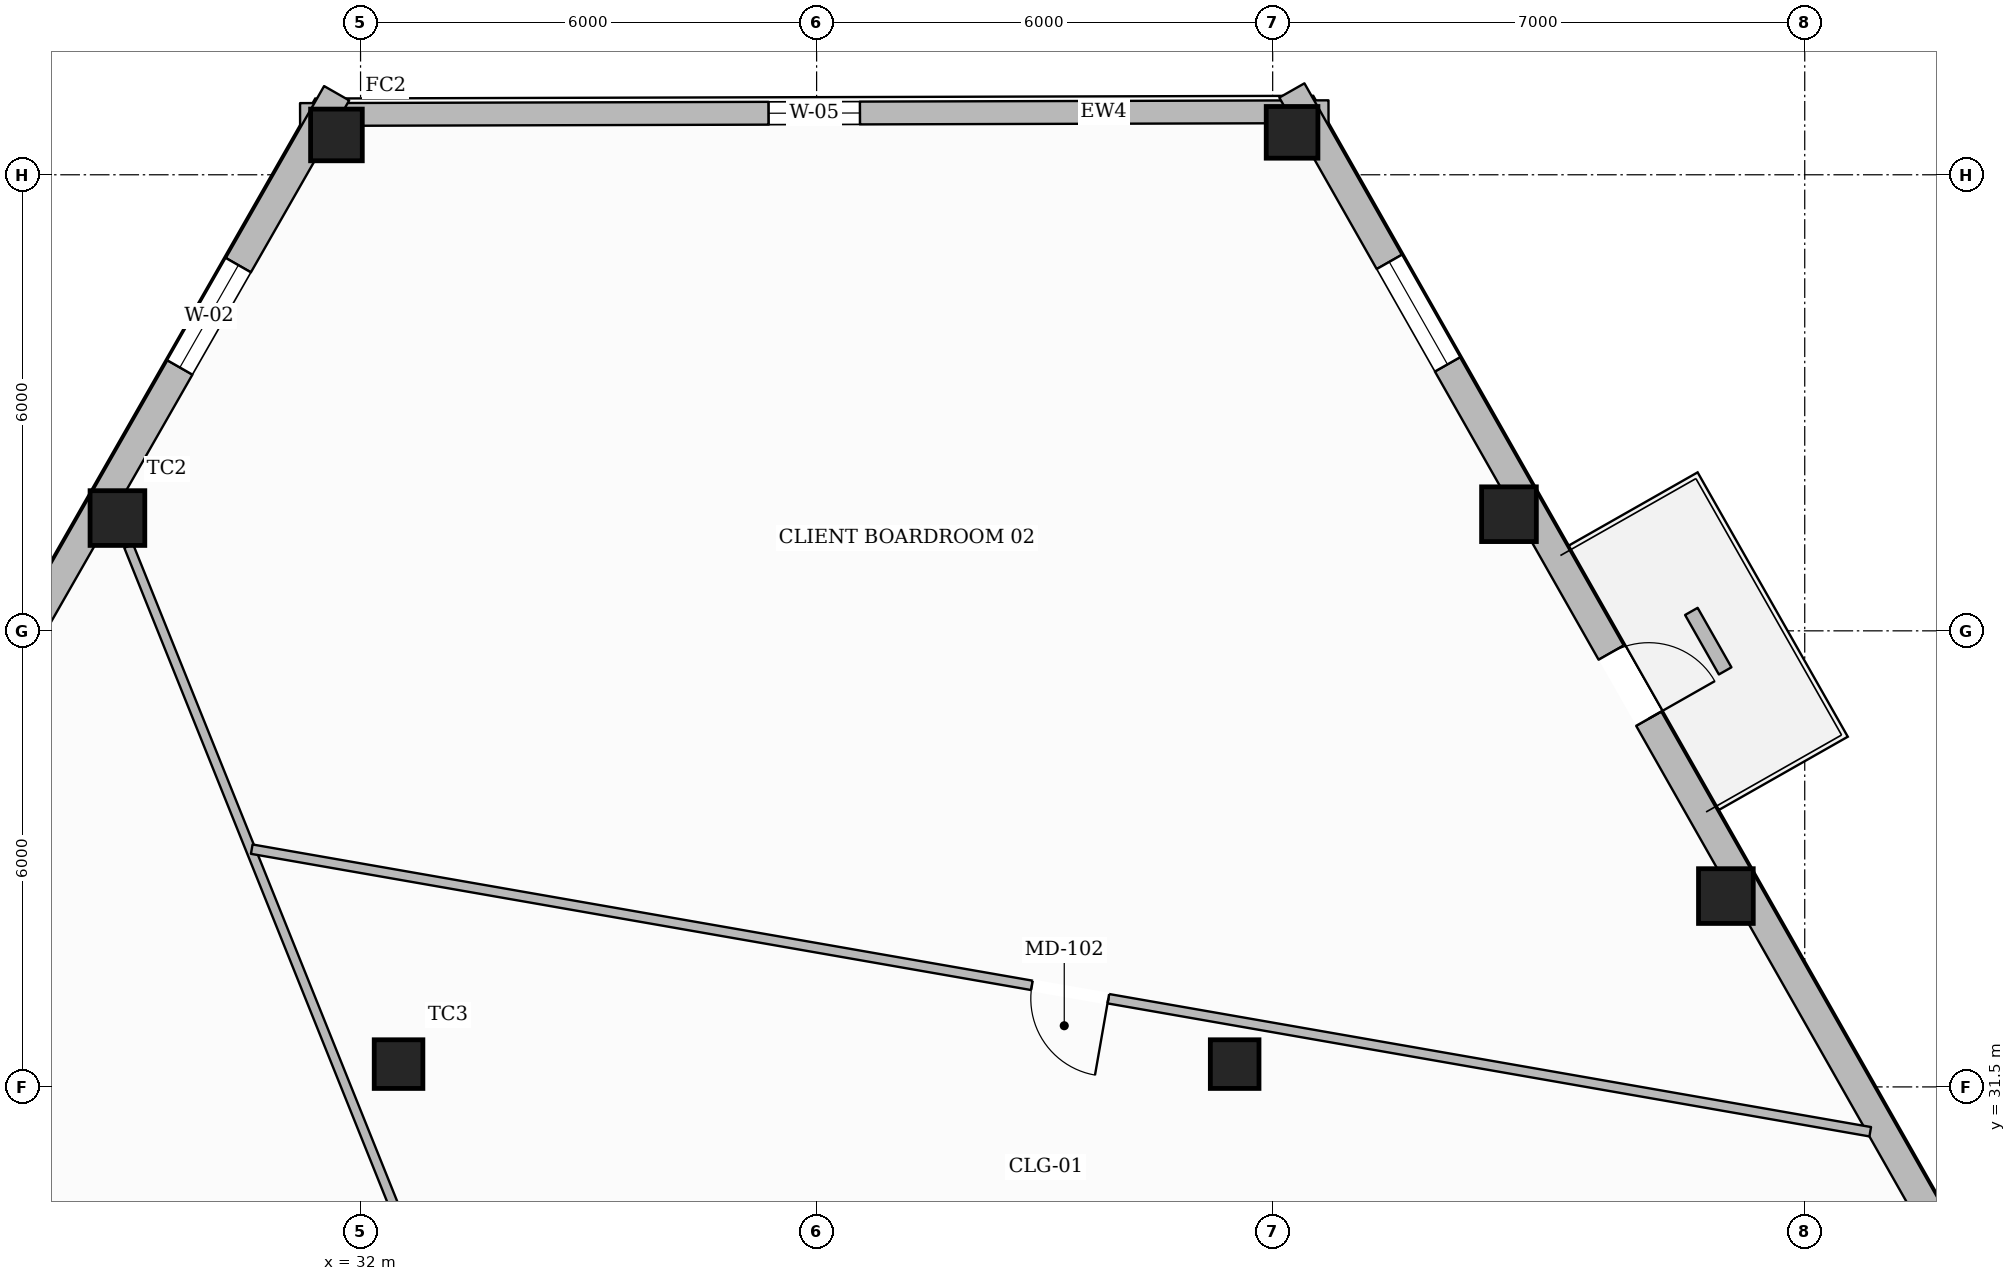
"""IFC4 building model, lengths in metres.
Left out: names, types, materials, properties, quantities, classifications, styles, units other than length and angle.
Written with IfcOpenShell. Run it as: python <this file> out.ifc"""

import sys

from ifc_helpers import new_model, si_unit, direction, frame, frame_2d, origin, origin_2d, place, context, subcontext, project, spatial, rectangle, hollow_rectangle, extrude, element, fill, save


model = new_model("IFC4")
c1 = context("Model", 3, precision=1e-05, world=origin(), true_north=direction((0.0, 1.0)))
c2 = subcontext(c1, "Body", "Model", "MODEL_VIEW")
j1 = project(units=[si_unit("LENGTHUNIT", "METRE"), si_unit("PLANEANGLEUNIT", "RADIAN")], contexts=[c1])
p1 = place(None, origin())
s1 = spatial("IfcSite", under=j1, at=p1, CompositionType="ELEMENT")
p2 = place(p1, origin())
s2 = spatial("IfcBuilding", under=s1, at=p2, CompositionType="ELEMENT")
p3 = place(p2, frame((0.0, 0.0, 89.35)))
s3 = spatial("IfcBuildingStorey", under=s2, at=p3, CompositionType="ELEMENT", Elevation=89.35)
p4 = place(p3, frame((31.683, 44.024, 0.0), z_axis=(0.0, 0.0, 1.0), x_axis=(1.0, 0.0, 0.0)))
e1 = element("IfcColumn", 1, at=p4, inside=s3, PredefinedType="COLUMN", context=c2, shape_type="SweptSolid", body=[
    extrude(hollow_rectangle(XDim=0.68, YDim=0.68, WallThickness=0.03, at=origin_2d()), origin(), (0.0, 0.0, 1.0), 3.6),
])
for number, where, z_axis, x_axis in (
    (2, (28.802, 38.984, 0.0), (0.0, 0.0, 1.0), (1.0, 0.0, 0.0)),
    (3, (49.963, 34.01, 0.0), (0.0, 0.0, 1.0), (1.0, 0.0, 0.0)),
    (4, (47.109, 39.034, 0.0), (0.0, 0.0, 1.0), (1.0, 0.0, 0.0)),
):
    element("IfcColumn", number, at=place(p3, frame(where, z_axis=z_axis, x_axis=x_axis)), inside=s3, PredefinedType="COLUMN", context=c2, shape_type="SweptSolid", body=[
        extrude(hollow_rectangle(XDim=0.72, YDim=0.72, WallThickness=0.032, at=origin_2d()), origin(), (0.0, 0.0, 1.0), 3.6),
    ])
p5 = place(p3, frame((44.255, 44.058, 0.0), z_axis=(0.0, 0.0, 1.0), x_axis=(1.0, 0.0, 0.0)))
e5 = element("IfcColumn", 5, at=p5, inside=s3, PredefinedType="COLUMN", context=c2, shape_type="SweptSolid", body=[
    extrude(hollow_rectangle(XDim=0.68, YDim=0.68, WallThickness=0.03, at=origin_2d()), origin(), (0.0, 0.0, 1.0), 3.6),
])
for number, where, z_axis, x_axis in (
    (6, (32.5, 31.8, 0.0), (0.0, 0.0, 1.0), (1.0, 0.0, 0.0)),
    (7, (43.5, 31.8, 0.0), (0.0, 0.0, 1.0), (1.0, 0.0, 0.0)),
):
    element("IfcColumn", number, at=place(p3, frame(where, z_axis=z_axis, x_axis=x_axis)), inside=s3, PredefinedType="COLUMN", context=c2, shape_type="SweptSolid", body=[
        extrude(hollow_rectangle(XDim=0.64, YDim=0.64, WallThickness=0.028, at=origin_2d()), origin(), (0.0, 0.0, 1.0), 3.6),
    ])
p6 = place(p3, frame((31.205, 44.293, 0.0), z_axis=(0.0, 0.0, 1.0), x_axis=(0.999996288033, 0.002724687192, 0.0)))
e8 = element("IfcWall", 8, at=p6, inside=s3, PredefinedType="STANDARD", context=c2, shape_type="SweptSolid", body=[
    extrude(rectangle(XDim=13.53, YDim=0.3, at=frame_2d((6.765, 0.0))), origin(), (0.0, 0.0, 1.0), 3.059),
])
p7 = place(p6, frame((6.165, 0.0, 0.65)))
e9 = element("IfcOpeningElement", 9, at=p7, cuts=e8, PredefinedType="OPENING", context=c2, shape_type="SweptSolid", body=[
    extrude(rectangle(XDim=1.2, YDim=1.7, at=frame_2d((0.6, 0.85))), frame((0.0, 0.16, 0.0), z_axis=(0.0, -1.0, 0.0), x_axis=(1.0, 0.0, 0.0)), (0.0, 0.0, 1.0), 0.32),
])
p8 = place(p3, frame((13.926, 13.506, 0.0), z_axis=(0.0, 0.0, 1.0), x_axis=(0.496286611319, 0.868158740914, 0.0)))
e10 = element("IfcWall", 10, at=p8, inside=s3, PredefinedType="STANDARD", context=c2, shape_type="SweptSolid", body=[
    extrude(rectangle(XDim=35.785, YDim=0.38, at=frame_2d((17.893, 0.0))), origin(), (0.0, 0.0, 1.0), 3.059),
])
p9 = place(p8, frame((31.63, 0.0, 0.65)))
e11 = element("IfcOpeningElement", 11, at=p9, cuts=e10, PredefinedType="OPENING", context=c2, shape_type="SweptSolid", body=[
    extrude(rectangle(XDim=1.55, YDim=1.75, at=frame_2d((0.775, 0.875))), frame((0.0, 0.2, 0.0), z_axis=(0.0, -1.0, 0.0), x_axis=(1.0, 0.0, 0.0)), (0.0, 0.0, 1.0), 0.4),
])
p10 = place(p8, frame((25.824, 0.0, 0.65)))
e12 = element("IfcOpeningElement", 12, at=p10, cuts=e10, PredefinedType="OPENING", context=c2, shape_type="SweptSolid", body=[
    extrude(rectangle(XDim=1.55, YDim=1.75, at=frame_2d((0.775, 0.875))), frame((0.0, 0.2, 0.0), z_axis=(0.0, -1.0, 0.0), x_axis=(1.0, 0.0, 0.0)), (0.0, 0.0, 1.0), 0.4),
])
p11 = place(p8, frame((20.018, 0.0, 0.65)))
e13 = element("IfcOpeningElement", 13, at=p11, cuts=e10, PredefinedType="OPENING", context=c2, shape_type="SweptSolid", body=[
    extrude(rectangle(XDim=1.55, YDim=1.75, at=frame_2d((0.775, 0.875))), frame((0.0, 0.2, 0.0), z_axis=(0.0, -1.0, 0.0), x_axis=(1.0, 0.0, 0.0)), (0.0, 0.0, 1.0), 0.4),
])
p12 = place(p8, frame((8.407, 0.0, 0.65)))
e14 = element("IfcOpeningElement", 14, at=p12, cuts=e10, PredefinedType="OPENING", context=c2, shape_type="SweptSolid", body=[
    extrude(rectangle(XDim=1.55, YDim=1.75, at=frame_2d((0.775, 0.875))), frame((0.0, 0.2, 0.0), z_axis=(0.0, -1.0, 0.0), x_axis=(1.0, 0.0, 0.0)), (0.0, 0.0, 1.0), 0.4),
])
p13 = place(p8, frame((2.601, 0.0, 0.65)))
e15 = element("IfcOpeningElement", 15, at=p13, cuts=e10, PredefinedType="OPENING", context=c2, shape_type="SweptSolid", body=[
    extrude(rectangle(XDim=1.55, YDim=1.75, at=frame_2d((0.775, 0.875))), frame((0.0, 0.2, 0.0), z_axis=(0.0, -1.0, 0.0), x_axis=(1.0, 0.0, 0.0)), (0.0, 0.0, 1.0), 0.4),
])
p14 = place(p3, frame((44.253, 44.609, 0.0), z_axis=(0.0, 0.0, 1.0), x_axis=(0.493917790196, -0.869508606356, 0.0)))
e16 = element("IfcWall", 16, at=p14, inside=s3, PredefinedType="STANDARD", context=c2, shape_type="SweptSolid", body=[
    extrude(rectangle(XDim=35.62, YDim=0.38, at=frame_2d((17.81, 0.0))), origin(), (0.0, 0.0, 1.0), 3.059),
])
p15 = place(p14, frame((8.505, 0.0, 0.0)))
e17 = element("IfcOpeningElement", 17, at=p15, cuts=e16, PredefinedType="OPENING", context=c2, shape_type="SweptSolid", body=[
    extrude(rectangle(XDim=1.0, YDim=2.2, at=frame_2d((0.5, 1.1))), frame((0.0, 0.2, 0.0), z_axis=(0.0, -1.0, 0.0), x_axis=(1.0, 0.0, 0.0)), (0.0, 0.0, 1.0), 0.4),
])
p16 = place(p14, frame((31.483, 0.0, 0.65)))
e18 = element("IfcOpeningElement", 18, at=p16, cuts=e16, PredefinedType="OPENING", context=c2, shape_type="SweptSolid", body=[
    extrude(rectangle(XDim=1.55, YDim=1.75, at=frame_2d((0.775, 0.875))), frame((0.0, 0.2, 0.0), z_axis=(0.0, -1.0, 0.0), x_axis=(1.0, 0.0, 0.0)), (0.0, 0.0, 1.0), 0.4),
])
p17 = place(p14, frame((25.705, 0.0, 0.65)))
e19 = element("IfcOpeningElement", 19, at=p17, cuts=e16, PredefinedType="OPENING", context=c2, shape_type="SweptSolid", body=[
    extrude(rectangle(XDim=1.55, YDim=1.75, at=frame_2d((0.775, 0.875))), frame((0.0, 0.2, 0.0), z_axis=(0.0, -1.0, 0.0), x_axis=(1.0, 0.0, 0.0)), (0.0, 0.0, 1.0), 0.4),
])
p18 = place(p14, frame((19.927, 0.0, 0.65)))
e20 = element("IfcOpeningElement", 20, at=p18, cuts=e16, PredefinedType="OPENING", context=c2, shape_type="SweptSolid", body=[
    extrude(rectangle(XDim=1.55, YDim=1.75, at=frame_2d((0.775, 0.875))), frame((0.0, 0.2, 0.0), z_axis=(0.0, -1.0, 0.0), x_axis=(1.0, 0.0, 0.0)), (0.0, 0.0, 1.0), 0.4),
])
p19 = place(p14, frame((2.594, 0.0, 0.65)))
e21 = element("IfcOpeningElement", 21, at=p19, cuts=e16, PredefinedType="OPENING", context=c2, shape_type="SweptSolid", body=[
    extrude(rectangle(XDim=1.55, YDim=1.75, at=frame_2d((0.775, 0.875))), frame((0.0, 0.2, 0.0), z_axis=(0.0, -1.0, 0.0), x_axis=(1.0, 0.0, 0.0)), (0.0, 0.0, 1.0), 0.4),
])
p20 = place(p3, frame((49.953, 36.973, 0.0), z_axis=(0.0, 0.0, 1.0), x_axis=(-0.494004746762, 0.869459205585, 0.0)))
e22 = element("IfcWall", 22, at=p20, inside=s3, PredefinedType="USERDEFINED", context=c2, shape_type="SweptSolid", body=[
    extrude(rectangle(XDim=0.9, YDim=0.19, at=frame_2d((0.45, 0.0))), origin(), (0.0, 0.0, 1.0), 0.5),
])
p21 = place(p3, frame((34.37, 25.131, 0.0), z_axis=(0.0, 0.0, 1.0), x_axis=(-0.372968583389, 0.927843971692, 0.0)))
e23 = element("IfcWall", 23, at=p21, inside=s3, PredefinedType="PARTITIONING", context=c2, shape_type="SweptSolid", body=[
    extrude(rectangle(XDim=14.534, YDim=0.125, at=frame_2d((7.267, 0.0))), origin(), (0.0, 0.0, 1.0), 3.141),
])
p22 = place(p3, frame((51.862, 30.91, 0.0), z_axis=(0.0, 0.0, 1.0), x_axis=(-0.98509938317, 0.17198606129, 0.0)))
e24 = element("IfcWall", 24, at=p22, inside=s3, PredefinedType="PARTITIONING", context=c2, shape_type="SweptSolid", body=[
    extrude(rectangle(XDim=21.615, YDim=0.125, at=frame_2d((10.808, 0.0))), origin(), (0.0, 0.0, 1.0), 3.288),
])
p23 = place(p22, frame((10.176, 0.0, 0.0)))
e25 = element("IfcOpeningElement", 25, at=p23, cuts=e24, PredefinedType="OPENING", context=c2, shape_type="SweptSolid", body=[
    extrude(rectangle(XDim=1.02, YDim=2.15, at=frame_2d((0.51, 1.075))), frame((0.0, 0.073, 0.0), z_axis=(0.0, -1.0, 0.0), x_axis=(1.0, 0.0, 0.0)), (0.0, 0.0, 1.0), 0.145),
])
p24 = place(p15, origin())
e26 = element("IfcDoor", 26, at=p24, inside=s3, OperationType="SINGLE_SWING_RIGHT", PredefinedType="DOOR", context=c2, shape_type="SweptSolid", body=[
    extrude(rectangle(XDim=1.0, YDim=2.2, at=frame_2d((0.5, 1.1))), frame((0.0, 0.025, 0.0), z_axis=(0.0, -1.0, 0.0), x_axis=(1.0, 0.0, 0.0)), (0.0, 0.0, 1.0), 0.05),
])
fill(e17, e26)
p25 = place(p9, origin())
e27 = element("IfcWindow", 27, at=p25, inside=s3, PartitioningType="SINGLE_PANEL", PredefinedType="WINDOW", context=c2, shape_type="SweptSolid", body=[
    extrude(rectangle(XDim=1.55, YDim=1.75, at=frame_2d((0.775, 0.875))), frame((0.0, 0.03, 0.0), z_axis=(0.0, -1.0, 0.0), x_axis=(1.0, 0.0, 0.0)), (0.0, 0.0, 1.0), 0.06),
])
fill(e11, e27)
p26 = place(p19, origin())
e28 = element("IfcWindow", 28, at=p26, inside=s3, PartitioningType="SINGLE_PANEL", PredefinedType="WINDOW", context=c2, shape_type="SweptSolid", body=[
    extrude(rectangle(XDim=1.55, YDim=1.75, at=frame_2d((0.775, 0.875))), frame((0.0, 0.03, 0.0), z_axis=(0.0, -1.0, 0.0), x_axis=(1.0, 0.0, 0.0)), (0.0, 0.0, 1.0), 0.06),
])
fill(e21, e28)
p27 = place(p7, origin())
e29 = element("IfcWindow", 29, at=p27, inside=s3, PartitioningType="SINGLE_PANEL", PredefinedType="WINDOW", context=c2, shape_type="SweptSolid", body=[
    extrude(rectangle(XDim=1.2, YDim=1.7, at=frame_2d((0.6, 0.85))), frame((0.0, 0.03, 0.0), z_axis=(0.0, -1.0, 0.0), x_axis=(1.0, 0.0, 0.0)), (0.0, 0.0, 1.0), 0.06),
])
fill(e9, e29)
p28 = place(p23, origin())
e30 = element("IfcDoor", 30, at=p28, inside=s3, OperationType="SINGLE_SWING_LEFT", PredefinedType="DOOR", context=c2, shape_type="SweptSolid", body=[
    extrude(rectangle(XDim=1.02, YDim=2.15, at=frame_2d((0.51, 1.075))), frame((0.0, 0.025, 0.0), z_axis=(0.0, -1.0, 0.0), x_axis=(1.0, 0.0, 0.0)), (0.0, 0.0, 1.0), 0.05),
])
fill(e25, e30)
save(model, sys.argv[1])
